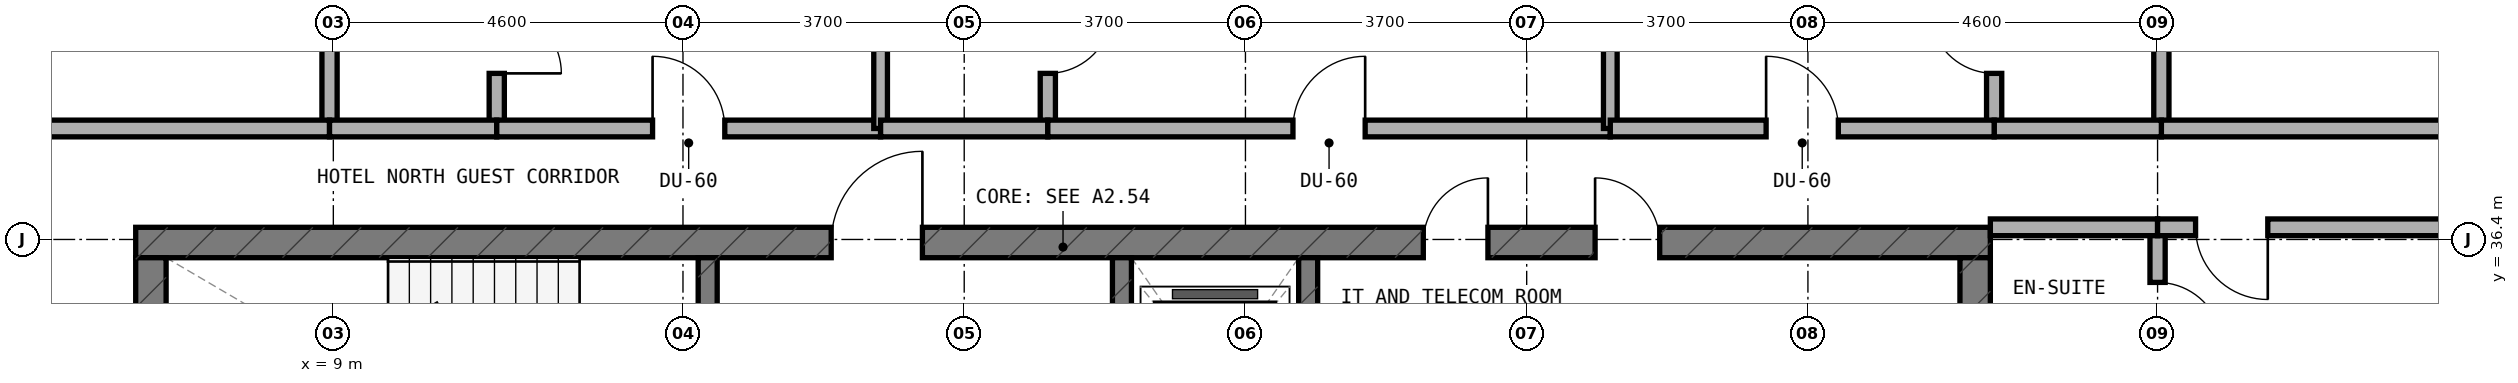
"""IFC4 building model, lengths in metres.
Left out: names, types, materials, properties, quantities, classifications, styles, units other than length and angle.
Written with IfcOpenShell. Run it as: python <this file> out.ifc"""

import sys

from ifc_helpers import new_model, si_unit, direction, frame, frame_2d, origin, place, context, subcontext, project, spatial, rectangle, extrude, element, fill, save


model = new_model("IFC4")
c1 = context("Model", 3, precision=1e-05, world=origin(), true_north=direction((0.0, 1.0)))
c2 = subcontext(c1, "Body", "Model", "MODEL_VIEW")
j1 = project(units=[si_unit("LENGTHUNIT", "METRE"), si_unit("PLANEANGLEUNIT", "RADIAN")], contexts=[c1])
p1 = place(None, origin())
s1 = spatial("IfcSite", under=j1, at=p1, CompositionType="ELEMENT")
p2 = place(p1, origin())
s2 = spatial("IfcBuilding", under=s1, at=p2, CompositionType="ELEMENT")
p3 = place(p2, frame((0.0, 0.0, 250.4)))
s3 = spatial("IfcBuildingStorey", under=s2, at=p3, CompositionType="ELEMENT", Elevation=250.4)
p4 = place(p3, frame((6.4, 36.36, 0.0), z_axis=(0.0, 0.0, 1.0), x_axis=(1.0, 0.0, 0.0)))
e1 = element("IfcWall", 1, at=p4, inside=s3, PredefinedType="SHEAR", context=c2, shape_type="SweptSolid", body=[
    extrude(rectangle(XDim=24.4, YDim=0.4, at=frame_2d((12.2, 0.0))), origin(), (0.0, 0.0, 1.0), 3.6),
])
p5 = place(p4, frame((9.15, 0.0, 0.0)))
e2 = element("IfcOpeningElement", 2, at=p5, cuts=e1, PredefinedType="OPENING", context=c2, shape_type="SweptSolid", body=[
    extrude(rectangle(XDim=1.2, YDim=2.15, at=frame_2d((0.6, 1.075))), frame((0.0, 0.21, 0.0), z_axis=(0.0, -1.0, 0.0), x_axis=(1.0, 0.0, 0.0)), (0.0, 0.0, 1.0), 0.42),
])
p6 = place(p4, frame((19.2, 0.0, 0.0)))
e3 = element("IfcOpeningElement", 3, at=p6, cuts=e1, PredefinedType="OPENING", context=c2, shape_type="SweptSolid", body=[
    extrude(rectangle(XDim=0.85, YDim=2.1, at=frame_2d((0.425, 1.05))), frame((0.0, 0.21, 0.0), z_axis=(0.0, -1.0, 0.0), x_axis=(1.0, 0.0, 0.0)), (0.0, 0.0, 1.0), 0.42),
])
p7 = place(p4, frame((16.94, 0.0, 0.0)))
e4 = element("IfcOpeningElement", 4, at=p7, cuts=e1, PredefinedType="OPENING", context=c2, shape_type="SweptSolid", body=[
    extrude(rectangle(XDim=0.85, YDim=2.1, at=frame_2d((0.425, 1.05))), frame((0.0, 0.21, 0.0), z_axis=(0.0, -1.0, 0.0), x_axis=(1.0, 0.0, 0.0)), (0.0, 0.0, 1.0), 0.42),
])
for number, where, z_axis, x_axis in (
    (5, (6.6, 33.0, 0.0), (0.0, 0.0, 1.0), (0.0, 1.0, 0.0)),
    (6, (30.6, 33.0, 0.0), (0.0, 0.0, 1.0), (0.0, 1.0, 0.0)),
):
    element("IfcWall", number, at=place(p3, frame(where, z_axis=z_axis, x_axis=x_axis)), inside=s3, PredefinedType="SHEAR", context=c2, shape_type="SweptSolid", body=[
        extrude(rectangle(XDim=3.16, YDim=0.4, at=frame_2d((1.58, 0.0))), origin(), (0.0, 0.0, 1.0), 3.6),
    ])
p8 = place(p3, frame((13.925, 33.0, 0.0), z_axis=(0.0, 0.0, 1.0), x_axis=(0.0, 1.0, 0.0)))
e7 = element("IfcWall", 7, at=p8, inside=s3, PredefinedType="STANDARD", context=c2, shape_type="SweptSolid", body=[
    extrude(rectangle(XDim=3.16, YDim=0.25, at=frame_2d((1.58, 0.0))), origin(), (0.0, 0.0, 1.0), 3.32),
])
p9 = place(p8, frame((0.98, 0.0, 0.0)))
e8 = element("IfcOpeningElement", 8, at=p9, cuts=e7, PredefinedType="OPENING", context=c2, shape_type="SweptSolid", body=[
    extrude(rectangle(XDim=1.1, YDim=2.15, at=frame_2d((0.55, 1.075))), frame((0.0, 0.135, 0.0), z_axis=(0.0, -1.0, 0.0), x_axis=(1.0, 0.0, 0.0)), (0.0, 0.0, 1.0), 0.27),
])
p10 = place(p3, frame((19.375, 33.0, 0.0), z_axis=(0.0, 0.0, 1.0), x_axis=(0.0, 1.0, 0.0)))
e9 = element("IfcWall", 9, at=p10, inside=s3, PredefinedType="STANDARD", context=c2, shape_type="SweptSolid", body=[
    extrude(rectangle(XDim=3.16, YDim=0.25, at=frame_2d((1.58, 0.0))), origin(), (0.0, 0.0, 1.0), 3.32),
])
p11 = place(p10, frame((0.98, 0.0, 0.0)))
e10 = element("IfcOpeningElement", 10, at=p11, cuts=e9, PredefinedType="OPENING", context=c2, shape_type="SweptSolid", body=[
    extrude(rectangle(XDim=1.1, YDim=2.15, at=frame_2d((0.55, 1.075))), frame((0.0, 0.135, 0.0), z_axis=(0.0, -1.0, 0.0), x_axis=(1.0, 0.0, 0.0)), (0.0, 0.0, 1.0), 0.27),
])
p12 = place(p3, frame((21.825, 33.0, 0.0), z_axis=(0.0, 0.0, 1.0), x_axis=(0.0, 1.0, 0.0)))
e11 = element("IfcWall", 11, at=p12, inside=s3, PredefinedType="STANDARD", context=c2, shape_type="SweptSolid", body=[
    extrude(rectangle(XDim=3.16, YDim=0.25, at=frame_2d((1.58, 0.0))), origin(), (0.0, 0.0, 1.0), 3.32),
])
p13 = place(p3, frame((11.15, 37.96, 0.0), z_axis=(0.0, 0.0, 1.0), x_axis=(0.0, 1.0, 0.0)))
e12 = element("IfcWall", 12, at=p13, inside=s3, PredefinedType="PLUMBINGWALL", context=c2, shape_type="SweptSolid", body=[
    extrude(rectangle(XDim=2.1, YDim=0.2, at=frame_2d((1.05, 0.0))), origin(), (0.0, 0.0, 1.0), 3.055),
])
p14 = place(p13, frame((0.625, 0.0, 0.0)))
e13 = element("IfcOpeningElement", 13, at=p14, cuts=e12, PredefinedType="OPENING", context=c2, shape_type="SweptSolid", body=[
    extrude(rectangle(XDim=0.85, YDim=2.1, at=frame_2d((0.425, 1.05))), frame((0.0, 0.11, 0.0), z_axis=(0.0, -1.0, 0.0), x_axis=(1.0, 0.0, 0.0)), (0.0, 0.0, 1.0), 0.22),
])
p15 = place(p3, frame((8.95, 37.96, 0.0), z_axis=(0.0, 0.0, 1.0), x_axis=(0.0, 1.0, 0.0)))
e14 = element("IfcWall", 14, at=p15, inside=s3, PredefinedType="PLUMBINGWALL", context=c2, shape_type="SweptSolid", body=[
    extrude(rectangle(XDim=2.1, YDim=0.2, at=frame_2d((1.05, 0.0))), origin(), (0.0, 0.0, 1.0), 3.055),
])
p16 = place(p3, frame((3.36, 37.86, 0.0), z_axis=(0.0, 0.0, 1.0), x_axis=(1.0, 0.0, 0.0)))
e15 = element("IfcWall", 15, at=p16, inside=s3, PredefinedType="SOLIDWALL", context=c2, shape_type="SweptSolid", body=[
    extrude(rectangle(XDim=5.59, YDim=0.22, at=frame_2d((2.795, 0.0))), origin(), (0.0, 0.0, 1.0), 2.745),
])
p17 = place(p3, frame((8.95, 37.86, 0.0), z_axis=(0.0, 0.0, 1.0), x_axis=(1.0, 0.0, 0.0)))
e16 = element("IfcWall", 16, at=p17, inside=s3, PredefinedType="SOLIDWALL", context=c2, shape_type="SweptSolid", body=[
    extrude(rectangle(XDim=2.2, YDim=0.22, at=frame_2d((1.1, 0.0))), origin(), (0.0, 0.0, 1.0), 3.32),
])
p18 = place(p3, frame((11.15, 37.86, 0.0), z_axis=(0.0, 0.0, 1.0), x_axis=(1.0, 0.0, 0.0)))
e17 = element("IfcWall", 17, at=p18, inside=s3, PredefinedType="SOLIDWALL", context=c2, shape_type="SweptSolid", body=[
    extrude(rectangle(XDim=5.05, YDim=0.22, at=frame_2d((2.525, 0.0))), origin(), (0.0, 0.0, 1.0), 2.745),
])
p19 = place(p18, frame((2.05, 0.0, 0.0)))
e18 = element("IfcOpeningElement", 18, at=p19, cuts=e17, PredefinedType="OPENING", context=c2, shape_type="SweptSolid", body=[
    extrude(rectangle(XDim=0.95, YDim=2.1, at=frame_2d((0.475, 1.05))), frame((0.0, 0.12, 0.0), z_axis=(0.0, -1.0, 0.0), x_axis=(1.0, 0.0, 0.0)), (0.0, 0.0, 1.0), 0.24),
])
p20 = place(p3, frame((16.2, 37.86, 0.0), z_axis=(0.0, 0.0, 1.0), x_axis=(0.0, 1.0, 0.0)))
e19 = element("IfcWall", 19, at=p20, inside=s3, PredefinedType="SOLIDWALL", context=c2, shape_type="SweptSolid", body=[
    extrude(rectangle(XDim=5.28, YDim=0.18, at=frame_2d((2.64, 0.0))), origin(), (0.0, 0.0, 1.0), 2.745),
])
p21 = place(p3, frame((18.4, 37.96, 0.0), z_axis=(0.0, 0.0, 1.0), x_axis=(0.0, 1.0, 0.0)))
e20 = element("IfcWall", 20, at=p21, inside=s3, PredefinedType="PLUMBINGWALL", context=c2, shape_type="SweptSolid", body=[
    extrude(rectangle(XDim=2.1, YDim=0.2, at=frame_2d((1.05, 0.0))), origin(), (0.0, 0.0, 1.0), 3.055),
])
p22 = place(p21, frame((0.625, 0.0, 0.0)))
e21 = element("IfcOpeningElement", 21, at=p22, cuts=e20, PredefinedType="OPENING", context=c2, shape_type="SweptSolid", body=[
    extrude(rectangle(XDim=0.85, YDim=2.1, at=frame_2d((0.425, 1.05))), frame((0.0, 0.11, 0.0), z_axis=(0.0, -1.0, 0.0), x_axis=(1.0, 0.0, 0.0)), (0.0, 0.0, 1.0), 0.22),
])
p23 = place(p3, frame((16.2, 37.86, 0.0), z_axis=(0.0, 0.0, 1.0), x_axis=(1.0, 0.0, 0.0)))
e22 = element("IfcWall", 22, at=p23, inside=s3, PredefinedType="SOLIDWALL", context=c2, shape_type="SweptSolid", body=[
    extrude(rectangle(XDim=2.2, YDim=0.22, at=frame_2d((1.1, 0.0))), origin(), (0.0, 0.0, 1.0), 2.745),
])
p24 = place(p3, frame((18.4, 37.86, 0.0), z_axis=(0.0, 0.0, 1.0), x_axis=(1.0, 0.0, 0.0)))
e23 = element("IfcWall", 23, at=p24, inside=s3, PredefinedType="SOLIDWALL", context=c2, shape_type="SweptSolid", body=[
    extrude(rectangle(XDim=7.4, YDim=0.22, at=frame_2d((3.7, 0.0))), origin(), (0.0, 0.0, 1.0), 2.745),
])
p25 = place(p24, frame((3.225, 0.0, 0.0)))
e24 = element("IfcOpeningElement", 24, at=p25, cuts=e23, PredefinedType="OPENING", context=c2, shape_type="SweptSolid", body=[
    extrude(rectangle(XDim=0.95, YDim=2.1, at=frame_2d((0.475, 1.05))), frame((0.0, 0.12, 0.0), z_axis=(0.0, -1.0, 0.0), x_axis=(1.0, 0.0, 0.0)), (0.0, 0.0, 1.0), 0.24),
])
p26 = place(p3, frame((25.8, 37.86, 0.0), z_axis=(0.0, 0.0, 1.0), x_axis=(0.0, 1.0, 0.0)))
e25 = element("IfcWall", 25, at=p26, inside=s3, PredefinedType="SOLIDWALL", context=c2, shape_type="SweptSolid", body=[
    extrude(rectangle(XDim=5.28, YDim=0.18, at=frame_2d((2.64, 0.0))), origin(), (0.0, 0.0, 1.0), 2.745),
])
p27 = place(p3, frame((30.85, 37.96, 0.0), z_axis=(0.0, 0.0, 1.0), x_axis=(0.0, 1.0, 0.0)))
e26 = element("IfcWall", 26, at=p27, inside=s3, PredefinedType="PLUMBINGWALL", context=c2, shape_type="SweptSolid", body=[
    extrude(rectangle(XDim=2.1, YDim=0.2, at=frame_2d((1.05, 0.0))), origin(), (0.0, 0.0, 1.0), 3.055),
])
p28 = place(p27, frame((0.625, 0.0, 0.0)))
e27 = element("IfcOpeningElement", 27, at=p28, cuts=e26, PredefinedType="OPENING", context=c2, shape_type="SweptSolid", body=[
    extrude(rectangle(XDim=0.85, YDim=2.1, at=frame_2d((0.425, 1.05))), frame((0.0, 0.11, 0.0), z_axis=(0.0, -1.0, 0.0), x_axis=(1.0, 0.0, 0.0)), (0.0, 0.0, 1.0), 0.22),
])
p29 = place(p3, frame((33.05, 37.96, 0.0), z_axis=(0.0, 0.0, 1.0), x_axis=(0.0, 1.0, 0.0)))
e28 = element("IfcWall", 28, at=p29, inside=s3, PredefinedType="PLUMBINGWALL", context=c2, shape_type="SweptSolid", body=[
    extrude(rectangle(XDim=2.1, YDim=0.2, at=frame_2d((1.05, 0.0))), origin(), (0.0, 0.0, 1.0), 3.055),
])
p30 = place(p3, frame((33.05, 37.86, 0.0), z_axis=(0.0, 0.0, 1.0), x_axis=(1.0, 0.0, 0.0)))
e29 = element("IfcWall", 29, at=p30, inside=s3, PredefinedType="SOLIDWALL", context=c2, shape_type="SweptSolid", body=[
    extrude(rectangle(XDim=5.59, YDim=0.22, at=frame_2d((2.795, 0.0))), origin(), (0.0, 0.0, 1.0), 2.745),
])
p31 = place(p3, frame((30.85, 37.86, 0.0), z_axis=(0.0, 0.0, 1.0), x_axis=(1.0, 0.0, 0.0)))
e30 = element("IfcWall", 30, at=p31, inside=s3, PredefinedType="SOLIDWALL", context=c2, shape_type="SweptSolid", body=[
    extrude(rectangle(XDim=2.2, YDim=0.22, at=frame_2d((1.1, 0.0))), origin(), (0.0, 0.0, 1.0), 3.32),
])
p32 = place(p3, frame((25.8, 37.86, 0.0), z_axis=(0.0, 0.0, 1.0), x_axis=(1.0, 0.0, 0.0)))
e31 = element("IfcWall", 31, at=p32, inside=s3, PredefinedType="SOLIDWALL", context=c2, shape_type="SweptSolid", body=[
    extrude(rectangle(XDim=5.05, YDim=0.22, at=frame_2d((2.525, 0.0))), origin(), (0.0, 0.0, 1.0), 2.745),
])
p33 = place(p32, frame((2.05, 0.0, 0.0)))
e32 = element("IfcOpeningElement", 32, at=p33, cuts=e31, PredefinedType="OPENING", context=c2, shape_type="SweptSolid", body=[
    extrude(rectangle(XDim=0.95, YDim=2.1, at=frame_2d((0.475, 1.05))), frame((0.0, 0.12, 0.0), z_axis=(0.0, -1.0, 0.0), x_axis=(1.0, 0.0, 0.0)), (0.0, 0.0, 1.0), 0.24),
])
p34 = place(p3, frame((33.0, 34.36, 0.0), z_axis=(0.0, 0.0, 1.0), x_axis=(0.0, 1.0, 0.0)))
e33 = element("IfcWall", 33, at=p34, inside=s3, PredefinedType="PLUMBINGWALL", context=c2, shape_type="SweptSolid", body=[
    extrude(rectangle(XDim=2.1, YDim=0.2, at=frame_2d((1.05, 0.0))), origin(), (0.0, 0.0, 1.0), 3.32),
])
p35 = place(p34, frame((0.625, 0.0, 0.0)))
e34 = element("IfcOpeningElement", 34, at=p35, cuts=e33, PredefinedType="OPENING", context=c2, shape_type="SweptSolid", body=[
    extrude(rectangle(XDim=0.85, YDim=2.1, at=frame_2d((0.425, 1.05))), frame((0.0, 0.11, 0.0), z_axis=(0.0, -1.0, 0.0), x_axis=(1.0, 0.0, 0.0)), (0.0, 0.0, 1.0), 0.22),
])
p36 = place(p3, frame((30.8, 36.56, 0.0), z_axis=(0.0, 0.0, 1.0), x_axis=(1.0, 0.0, 0.0)))
e35 = element("IfcWall", 35, at=p36, inside=s3, PredefinedType="SOLIDWALL", context=c2, shape_type="SweptSolid", body=[
    extrude(rectangle(XDim=2.2, YDim=0.22, at=frame_2d((1.1, 0.0))), origin(), (0.0, 0.0, 1.0), 3.32),
])
p37 = place(p3, frame((33.0, 36.56, 0.0), z_axis=(0.0, 0.0, 1.0), x_axis=(1.0, 0.0, 0.0)))
e36 = element("IfcWall", 36, at=p37, inside=s3, PredefinedType="SOLIDWALL", context=c2, shape_type="SweptSolid", body=[
    extrude(rectangle(XDim=5.8, YDim=0.22, at=frame_2d((2.9, 0.0))), origin(), (0.0, 0.0, 1.0), 2.745),
])
p38 = place(p37, frame((0.5, 0.0, 0.0)))
e37 = element("IfcOpeningElement", 37, at=p38, cuts=e36, PredefinedType="OPENING", context=c2, shape_type="SweptSolid", body=[
    extrude(rectangle(XDim=0.95, YDim=2.1, at=frame_2d((0.475, 1.05))), frame((0.0, 0.12, 0.0), z_axis=(0.0, -1.0, 0.0), x_axis=(1.0, 0.0, 0.0)), (0.0, 0.0, 1.0), 0.24),
])
p39 = place(p5, origin())
e38 = element("IfcDoor", 38, at=p39, inside=s3, OperationType="SINGLE_SWING_RIGHT", PredefinedType="DOOR", context=c2, shape_type="SweptSolid", body=[
    extrude(rectangle(XDim=1.2, YDim=2.15, at=frame_2d((0.6, 1.075))), frame((0.0, 0.025, 0.0), z_axis=(0.0, -1.0, 0.0), x_axis=(1.0, 0.0, 0.0)), (0.0, 0.0, 1.0), 0.05),
])
fill(e2, e38)
p40 = place(p6, origin())
e39 = element("IfcDoor", 39, at=p40, inside=s3, OperationType="SINGLE_SWING_LEFT", PredefinedType="DOOR", context=c2, shape_type="SweptSolid", body=[
    extrude(rectangle(XDim=0.85, YDim=2.1, at=frame_2d((0.425, 1.05))), frame((0.0, 0.025, 0.0), z_axis=(0.0, -1.0, 0.0), x_axis=(1.0, 0.0, 0.0)), (0.0, 0.0, 1.0), 0.05),
])
fill(e3, e39)
p41 = place(p7, origin())
e40 = element("IfcDoor", 40, at=p41, inside=s3, OperationType="SINGLE_SWING_RIGHT", PredefinedType="DOOR", context=c2, shape_type="SweptSolid", body=[
    extrude(rectangle(XDim=0.85, YDim=2.1, at=frame_2d((0.425, 1.05))), frame((0.0, 0.025, 0.0), z_axis=(0.0, -1.0, 0.0), x_axis=(1.0, 0.0, 0.0)), (0.0, 0.0, 1.0), 0.05),
])
fill(e4, e40)
p42 = place(p14, frame((0.85, 0.0, 0.0), z_axis=(0.0, 0.0, 1.0), x_axis=(-1.0, 0.0, 0.0)))
e41 = element("IfcDoor", 41, at=p42, inside=s3, OperationType="SINGLE_SWING_RIGHT", PredefinedType="DOOR", context=c2, shape_type="SweptSolid", body=[
    extrude(rectangle(XDim=0.85, YDim=2.1, at=frame_2d((0.425, 1.05))), frame((0.0, 0.025, 0.0), z_axis=(0.0, -1.0, 0.0), x_axis=(1.0, 0.0, 0.0)), (0.0, 0.0, 1.0), 0.05),
])
fill(e13, e41)
p43 = place(p19, origin())
e42 = element("IfcDoor", 42, at=p43, inside=s3, OperationType="SINGLE_SWING_LEFT", PredefinedType="DOOR", context=c2, shape_type="SweptSolid", body=[
    extrude(rectangle(XDim=0.95, YDim=2.1, at=frame_2d((0.475, 1.05))), frame((0.0, 0.025, 0.0), z_axis=(0.0, -1.0, 0.0), x_axis=(1.0, 0.0, 0.0)), (0.0, 0.0, 1.0), 0.05),
])
fill(e18, e42)
p44 = place(p22, frame((0.85, 0.0, 0.0), z_axis=(0.0, 0.0, 1.0), x_axis=(-1.0, 0.0, 0.0)))
e43 = element("IfcDoor", 43, at=p44, inside=s3, OperationType="SINGLE_SWING_LEFT", PredefinedType="DOOR", context=c2, shape_type="SweptSolid", body=[
    extrude(rectangle(XDim=0.85, YDim=2.1, at=frame_2d((0.425, 1.05))), frame((0.0, 0.025, 0.0), z_axis=(0.0, -1.0, 0.0), x_axis=(1.0, 0.0, 0.0)), (0.0, 0.0, 1.0), 0.05),
])
fill(e21, e43)
p45 = place(p25, origin())
e44 = element("IfcDoor", 44, at=p45, inside=s3, OperationType="SINGLE_SWING_RIGHT", PredefinedType="DOOR", context=c2, shape_type="SweptSolid", body=[
    extrude(rectangle(XDim=0.95, YDim=2.1, at=frame_2d((0.475, 1.05))), frame((0.0, 0.025, 0.0), z_axis=(0.0, -1.0, 0.0), x_axis=(1.0, 0.0, 0.0)), (0.0, 0.0, 1.0), 0.05),
])
fill(e24, e44)
p46 = place(p28, origin())
e45 = element("IfcDoor", 45, at=p46, inside=s3, OperationType="SINGLE_SWING_RIGHT", PredefinedType="DOOR", context=c2, shape_type="SweptSolid", body=[
    extrude(rectangle(XDim=0.85, YDim=2.1, at=frame_2d((0.425, 1.05))), frame((0.0, 0.025, 0.0), z_axis=(0.0, -1.0, 0.0), x_axis=(1.0, 0.0, 0.0)), (0.0, 0.0, 1.0), 0.05),
])
fill(e27, e45)
p47 = place(p33, origin())
e46 = element("IfcDoor", 46, at=p47, inside=s3, OperationType="SINGLE_SWING_LEFT", PredefinedType="DOOR", context=c2, shape_type="SweptSolid", body=[
    extrude(rectangle(XDim=0.95, YDim=2.1, at=frame_2d((0.475, 1.05))), frame((0.0, 0.025, 0.0), z_axis=(0.0, -1.0, 0.0), x_axis=(1.0, 0.0, 0.0)), (0.0, 0.0, 1.0), 0.05),
])
fill(e32, e46)
p48 = place(p35, frame((0.85, 0.0, 0.0), z_axis=(0.0, 0.0, 1.0), x_axis=(-1.0, 0.0, 0.0)))
e47 = element("IfcDoor", 47, at=p48, inside=s3, OperationType="SINGLE_SWING_RIGHT", PredefinedType="DOOR", context=c2, shape_type="SweptSolid", body=[
    extrude(rectangle(XDim=0.85, YDim=2.1, at=frame_2d((0.425, 1.05))), frame((0.0, 0.025, 0.0), z_axis=(0.0, -1.0, 0.0), x_axis=(1.0, 0.0, 0.0)), (0.0, 0.0, 1.0), 0.05),
])
fill(e34, e47)
p49 = place(p38, frame((0.95, 0.0, 0.0), z_axis=(0.0, 0.0, 1.0), x_axis=(-1.0, 0.0, 0.0)))
e48 = element("IfcDoor", 48, at=p49, inside=s3, OperationType="SINGLE_SWING_LEFT", PredefinedType="DOOR", context=c2, shape_type="SweptSolid", body=[
    extrude(rectangle(XDim=0.95, YDim=2.1, at=frame_2d((0.475, 1.05))), frame((0.0, 0.025, 0.0), z_axis=(0.0, -1.0, 0.0), x_axis=(1.0, 0.0, 0.0)), (0.0, 0.0, 1.0), 0.05),
])
fill(e37, e48)
save(model, sys.argv[1])
